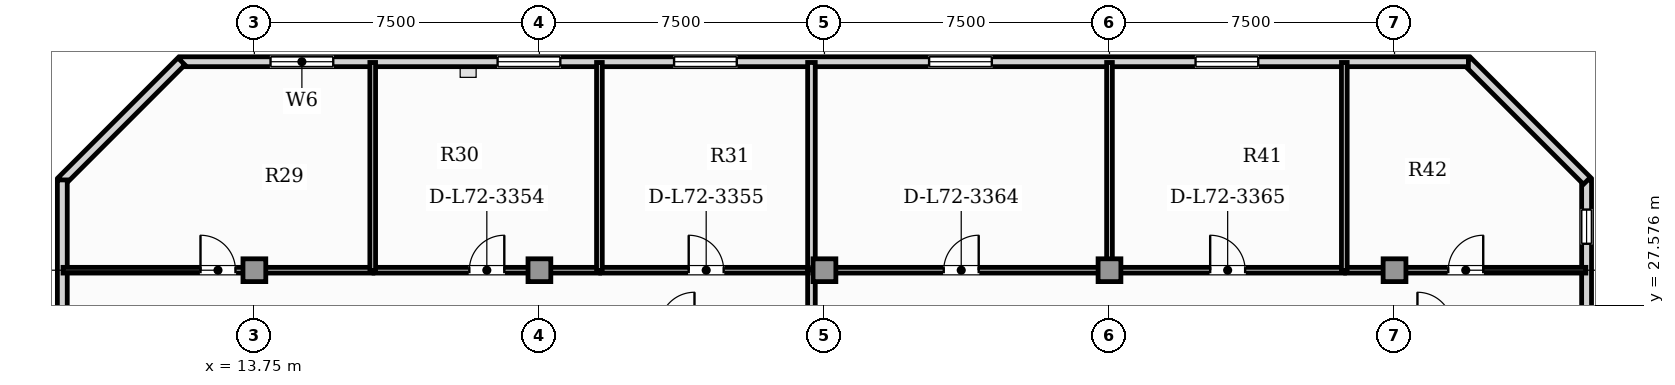
"""IFC4 building model, lengths in metres.
Left out: names, types, materials, properties, quantities, classifications, styles, units other than length and angle.
Written with IfcOpenShell. Run it as: python <this file> out.ifc"""

import sys

from ifc_helpers import new_model, si_unit, direction, frame, frame_2d, origin, origin_2d, place, context, subcontext, project, spatial, rectangle, extrude, element, fill, save


model = new_model("IFC4")
c1 = context("Model", 3, precision=1e-05, world=origin(), true_north=direction((0.0, 1.0)))
c2 = subcontext(c1, "Body", "Model", "MODEL_VIEW")
j1 = project(units=[si_unit("LENGTHUNIT", "METRE"), si_unit("PLANEANGLEUNIT", "RADIAN")], contexts=[c1])
p1 = place(None, origin())
s1 = spatial("IfcSite", under=j1, at=p1, CompositionType="ELEMENT")
p2 = place(p1, origin())
s2 = spatial("IfcBuilding", under=s1, at=p2, CompositionType="ELEMENT")
p3 = place(p2, frame((0.0, 0.0, 292.6)))
s3 = spatial("IfcBuildingStorey", under=s2, at=p3, CompositionType="ELEMENT", Elevation=292.6)
for number, where, z_axis, x_axis in (
    (1, (13.75, 28.5, 0.0), (0.0, 0.0, 1.0), (1.0, 0.0, 0.0)),
    (2, (21.25, 28.5, 0.0), (0.0, 0.0, 1.0), (1.0, 0.0, 0.0)),
    (3, (28.75, 28.5, 0.0), (0.0, 0.0, 1.0), (1.0, 0.0, 0.0)),
    (4, (36.25, 28.5, 0.0), (0.0, 0.0, 1.0), (1.0, 0.0, 0.0)),
    (5, (43.75, 28.5, 0.0), (0.0, 0.0, 1.0), (1.0, 0.0, 0.0)),
):
    element("IfcColumn", number, at=place(p3, frame(where, z_axis=z_axis, x_axis=x_axis)), inside=s3, PredefinedType="COLUMN", context=c2, shape_type="SweptSolid", body=[
        extrude(rectangle(XDim=0.6, YDim=0.6, at=origin_2d()), origin(), (0.0, 0.0, 1.0), 3.85),
    ])
p4 = place(p3, frame((48.804, 25.798, 0.0), z_axis=(0.0, 0.0, 1.0), x_axis=(0.0, 1.0, 0.0)))
e6 = element("IfcWall", 6, at=p4, inside=s3, PredefinedType="SOLIDWALL", context=c2, shape_type="SweptSolid", body=[
    extrude(rectangle(XDim=5.078, YDim=0.26, at=frame_2d((2.539, 0.0))), origin(), (0.0, 0.0, 1.0), 3.65),
])
p5 = place(p4, frame((3.398, 0.0, 0.95)))
e7 = element("IfcOpeningElement", 7, at=p5, cuts=e6, PredefinedType="OPENING", context=c2, shape_type="SweptSolid", body=[
    extrude(rectangle(XDim=0.9, YDim=1.5, at=frame_2d((0.45, 0.75))), frame((0.0, 0.14, 0.0), z_axis=(0.0, -1.0, 0.0), x_axis=(1.0, 0.0, 0.0)), (0.0, 0.0, 1.0), 0.28),
])
p6 = place(p3, frame((48.813, 30.852, 0.0), z_axis=(0.0, 0.0, 1.0), x_axis=(-0.707134240044, 0.707079321262, 0.0)))
e8 = element("IfcWall", 8, at=p6, inside=s3, PredefinedType="SOLIDWALL", context=c2, shape_type="SweptSolid", body=[
    extrude(rectangle(XDim=4.446, YDim=0.26, at=frame_2d((2.223, 0.0))), origin(), (0.0, 0.0, 1.0), 3.65),
])
p7 = place(p3, frame((45.694, 33.986, 0.0), z_axis=(0.0, 0.0, 1.0), x_axis=(-1.0, 0.0, 0.0)))
e9 = element("IfcWall", 9, at=p7, inside=s3, PredefinedType="SOLIDWALL", context=c2, shape_type="SweptSolid", body=[
    extrude(rectangle(XDim=33.887, YDim=0.26, at=frame_2d((16.944, 0.0))), origin(), (0.0, 0.0, 1.0), 3.65),
])
p8 = place(p7, frame((29.868, 0.0, 0.88)))
e10 = element("IfcOpeningElement", 10, at=p8, cuts=e9, PredefinedType="OPENING", context=c2, shape_type="SweptSolid", body=[
    extrude(rectangle(XDim=1.65, YDim=2.0, at=frame_2d((0.825, 1.0))), frame((0.0, 0.14, 0.0), z_axis=(0.0, -1.0, 0.0), x_axis=(1.0, 0.0, 0.0)), (0.0, 0.0, 1.0), 0.28),
])
p9 = place(p7, frame((23.894, 0.0, 0.88)))
e11 = element("IfcOpeningElement", 11, at=p9, cuts=e9, PredefinedType="OPENING", context=c2, shape_type="SweptSolid", body=[
    extrude(rectangle(XDim=1.65, YDim=2.0, at=frame_2d((0.825, 1.0))), frame((0.0, 0.14, 0.0), z_axis=(0.0, -1.0, 0.0), x_axis=(1.0, 0.0, 0.0)), (0.0, 0.0, 1.0), 0.28),
])
p10 = place(p7, frame((19.25, 0.0, 0.88)))
e12 = element("IfcOpeningElement", 12, at=p10, cuts=e9, PredefinedType="OPENING", context=c2, shape_type="SweptSolid", body=[
    extrude(rectangle(XDim=1.65, YDim=2.0, at=frame_2d((0.825, 1.0))), frame((0.0, 0.14, 0.0), z_axis=(0.0, -1.0, 0.0), x_axis=(1.0, 0.0, 0.0)), (0.0, 0.0, 1.0), 0.28),
])
p11 = place(p7, frame((12.54, 0.0, 0.88)))
e13 = element("IfcOpeningElement", 13, at=p11, cuts=e9, PredefinedType="OPENING", context=c2, shape_type="SweptSolid", body=[
    extrude(rectangle(XDim=1.65, YDim=2.0, at=frame_2d((0.825, 1.0))), frame((0.0, 0.14, 0.0), z_axis=(0.0, -1.0, 0.0), x_axis=(1.0, 0.0, 0.0)), (0.0, 0.0, 1.0), 0.28),
])
p12 = place(p7, frame((5.529, 0.0, 0.88)))
e14 = element("IfcOpeningElement", 14, at=p12, cuts=e9, PredefinedType="OPENING", context=c2, shape_type="SweptSolid", body=[
    extrude(rectangle(XDim=1.65, YDim=2.0, at=frame_2d((0.825, 1.0))), frame((0.0, 0.14, 0.0), z_axis=(0.0, -1.0, 0.0), x_axis=(1.0, 0.0, 0.0)), (0.0, 0.0, 1.0), 0.28),
])
p13 = place(p3, frame((11.83, 33.995, 0.0), z_axis=(0.0, 0.0, 1.0), x_axis=(-0.707134240044, -0.707079321262, 0.0)))
e15 = element("IfcWall", 15, at=p13, inside=s3, PredefinedType="SOLIDWALL", context=c2, shape_type="SweptSolid", body=[
    extrude(rectangle(XDim=4.446, YDim=0.26, at=frame_2d((2.223, 0.0))), origin(), (0.0, 0.0, 1.0), 3.65),
])
p14 = place(p3, frame((8.696, 30.875, 0.0), z_axis=(0.0, 0.0, 1.0), x_axis=(0.0, -1.0, 0.0)))
e16 = element("IfcWall", 16, at=p14, inside=s3, PredefinedType="SOLIDWALL", context=c2, shape_type="SweptSolid", body=[
    extrude(rectangle(XDim=5.078, YDim=0.26, at=frame_2d((2.539, 0.0))), origin(), (0.0, 0.0, 1.0), 3.65),
])
p15 = place(p3, frame((8.716, 28.5, 0.0), z_axis=(0.0, 0.0, 1.0), x_axis=(1.0, 0.0, 0.0)))
e17 = element("IfcWall", 17, at=p15, inside=s3, PredefinedType="PARTITIONING", context=c2, shape_type="SweptSolid", body=[
    extrude(rectangle(XDim=8.153, YDim=0.15, at=frame_2d((4.077, 0.0))), origin(), (0.0, 0.0, 1.0), 3.117),
])
p16 = place(p15, frame((3.616, 0.0, 0.0)))
e18 = element("IfcOpeningElement", 18, at=p16, cuts=e17, PredefinedType="OPENING", context=c2, shape_type="SweptSolid", body=[
    extrude(rectangle(XDim=0.92, YDim=2.1, at=frame_2d((0.46, 1.05))), frame((0.0, 0.085, 0.0), z_axis=(0.0, -1.0, 0.0), x_axis=(1.0, 0.0, 0.0)), (0.0, 0.0, 1.0), 0.17),
])
p17 = place(p3, frame((16.899, 28.5, 0.0), z_axis=(0.0, 0.0, 1.0), x_axis=(1.0, 0.0, 0.0)))
e19 = element("IfcWall", 19, at=p17, inside=s3, PredefinedType="PARTITIONING", context=c2, shape_type="SweptSolid", body=[
    extrude(rectangle(XDim=5.935, YDim=0.15, at=frame_2d((2.967, 0.0))), origin(), (0.0, 0.0, 1.0), 3.117),
])
p18 = place(p17, frame((2.507, 0.0, 0.0)))
e20 = element("IfcOpeningElement", 20, at=p18, cuts=e19, PredefinedType="OPENING", context=c2, shape_type="SweptSolid", body=[
    extrude(rectangle(XDim=0.92, YDim=2.1, at=frame_2d((0.46, 1.05))), frame((0.0, 0.085, 0.0), z_axis=(0.0, -1.0, 0.0), x_axis=(1.0, 0.0, 0.0)), (0.0, 0.0, 1.0), 0.17),
])
p19 = place(p3, frame((22.864, 28.5, 0.0), z_axis=(0.0, 0.0, 1.0), x_axis=(1.0, 0.0, 0.0)))
e21 = element("IfcWall", 21, at=p19, inside=s3, PredefinedType="PARTITIONING", context=c2, shape_type="SweptSolid", body=[
    extrude(rectangle(XDim=5.549, YDim=0.15, at=frame_2d((2.775, 0.0))), origin(), (0.0, 0.0, 1.0), 3.117),
])
p20 = place(p19, frame((2.315, 0.0, 0.0)))
e22 = element("IfcOpeningElement", 22, at=p20, cuts=e21, PredefinedType="OPENING", context=c2, shape_type="SweptSolid", body=[
    extrude(rectangle(XDim=0.92, YDim=2.1, at=frame_2d((0.46, 1.05))), frame((0.0, 0.085, 0.0), z_axis=(0.0, -1.0, 0.0), x_axis=(1.0, 0.0, 0.0)), (0.0, 0.0, 1.0), 0.17),
])
p21 = place(p3, frame((28.408, 26.995, 0.0), z_axis=(0.0, 0.0, 1.0), x_axis=(0.0, 1.0, 0.0)))
e23 = element("IfcWall", 23, at=p21, inside=s3, PredefinedType="PARTITIONING", context=c2, shape_type="SweptSolid", body=[
    extrude(rectangle(XDim=1.51, YDim=0.2, at=frame_2d((0.755, 0.0))), origin(), (0.0, 0.0, 1.0), 3.65),
])
for number, where, z_axis, x_axis in (
    (24, (16.864, 28.495, 0.0), (0.0, 0.0, 1.0), (0.0, 1.0, 0.0)),
    (25, (22.829, 28.495, 0.0), (0.0, 0.0, 1.0), (0.0, 1.0, 0.0)),
):
    element("IfcWall", number, at=place(p3, frame(where, z_axis=z_axis, x_axis=x_axis)), inside=s3, PredefinedType="PARTITIONING", context=c2, shape_type="SweptSolid", body=[
        extrude(rectangle(XDim=5.471, YDim=0.15, at=frame_2d((2.735, 0.0))), origin(), (0.0, 0.0, 1.0), 3.65),
    ])
p22 = place(p3, frame((28.408, 28.535, 0.0), z_axis=(0.0, 0.0, 1.0), x_axis=(0.0, 1.0, 0.0)))
e26 = element("IfcWall", 26, at=p22, inside=s3, PredefinedType="PARTITIONING", context=c2, shape_type="SweptSolid", body=[
    extrude(rectangle(XDim=5.431, YDim=0.2, at=frame_2d((2.716, 0.0))), origin(), (0.0, 0.0, 1.0), 3.65),
])
p23 = place(p3, frame((28.443, 28.5, 0.0), z_axis=(0.0, 0.0, 1.0), x_axis=(1.0, 0.0, 0.0)))
e27 = element("IfcWall", 27, at=p23, inside=s3, PredefinedType="PARTITIONING", context=c2, shape_type="SweptSolid", body=[
    extrude(rectangle(XDim=7.812, YDim=0.15, at=frame_2d((3.906, 0.0))), origin(), (0.0, 0.0, 1.0), 3.117),
])
p24 = place(p23, frame((3.446, 0.0, 0.0)))
e28 = element("IfcOpeningElement", 28, at=p24, cuts=e27, PredefinedType="OPENING", context=c2, shape_type="SweptSolid", body=[
    extrude(rectangle(XDim=0.92, YDim=2.1, at=frame_2d((0.46, 1.05))), frame((0.0, 0.085, 0.0), z_axis=(0.0, -1.0, 0.0), x_axis=(1.0, 0.0, 0.0)), (0.0, 0.0, 1.0), 0.17),
])
p25 = place(p3, frame((36.285, 28.5, 0.0), z_axis=(0.0, 0.0, 1.0), x_axis=(1.0, 0.0, 0.0)))
e29 = element("IfcWall", 29, at=p25, inside=s3, PredefinedType="PARTITIONING", context=c2, shape_type="SweptSolid", body=[
    extrude(rectangle(XDim=6.149, YDim=0.15, at=frame_2d((3.074, 0.0))), origin(), (0.0, 0.0, 1.0), 3.117),
])
p26 = place(p25, frame((2.614, 0.0, 0.0)))
e30 = element("IfcOpeningElement", 30, at=p26, cuts=e29, PredefinedType="OPENING", context=c2, shape_type="SweptSolid", body=[
    extrude(rectangle(XDim=0.92, YDim=2.1, at=frame_2d((0.46, 1.05))), frame((0.0, 0.085, 0.0), z_axis=(0.0, -1.0, 0.0), x_axis=(1.0, 0.0, 0.0)), (0.0, 0.0, 1.0), 0.17),
])
p27 = place(p3, frame((42.464, 28.5, 0.0), z_axis=(0.0, 0.0, 1.0), x_axis=(1.0, 0.0, 0.0)))
e31 = element("IfcWall", 31, at=p27, inside=s3, PredefinedType="PARTITIONING", context=c2, shape_type="SweptSolid", body=[
    extrude(rectangle(XDim=6.321, YDim=0.15, at=frame_2d((3.16, 0.0))), origin(), (0.0, 0.0, 1.0), 3.117),
])
p28 = place(p27, frame((2.7, 0.0, 0.0)))
e32 = element("IfcOpeningElement", 32, at=p28, cuts=e31, PredefinedType="OPENING", context=c2, shape_type="SweptSolid", body=[
    extrude(rectangle(XDim=0.92, YDim=2.1, at=frame_2d((0.46, 1.05))), frame((0.0, 0.085, 0.0), z_axis=(0.0, -1.0, 0.0), x_axis=(1.0, 0.0, 0.0)), (0.0, 0.0, 1.0), 0.17),
])
for number, where, z_axis, x_axis in (
    (33, (36.25, 28.495, 0.0), (0.0, 0.0, 1.0), (0.0, 1.0, 0.0)),
    (34, (42.429, 28.495, 0.0), (0.0, 0.0, 1.0), (0.0, 1.0, 0.0)),
):
    element("IfcWall", number, at=place(p3, frame(where, z_axis=z_axis, x_axis=x_axis)), inside=s3, PredefinedType="PARTITIONING", context=c2, shape_type="SweptSolid", body=[
        extrude(rectangle(XDim=5.471, YDim=0.15, at=frame_2d((2.735, 0.0))), origin(), (0.0, 0.0, 1.0), 3.65),
    ])
p29 = place(p8, origin())
e35 = element("IfcWindow", 35, at=p29, inside=s3, PartitioningType="SINGLE_PANEL", PredefinedType="WINDOW", context=c2, shape_type="SweptSolid", body=[
    extrude(rectangle(XDim=1.65, YDim=2.0, at=frame_2d((0.825, 1.0))), frame((0.0, 0.03, 0.0), z_axis=(0.0, -1.0, 0.0), x_axis=(1.0, 0.0, 0.0)), (0.0, 0.0, 1.0), 0.06),
])
fill(e10, e35)
p30 = place(p9, origin())
e36 = element("IfcWindow", 36, at=p30, inside=s3, PartitioningType="SINGLE_PANEL", PredefinedType="WINDOW", context=c2, shape_type="SweptSolid", body=[
    extrude(rectangle(XDim=1.65, YDim=2.0, at=frame_2d((0.825, 1.0))), frame((0.0, 0.03, 0.0), z_axis=(0.0, -1.0, 0.0), x_axis=(1.0, 0.0, 0.0)), (0.0, 0.0, 1.0), 0.06),
])
fill(e11, e36)
p31 = place(p10, origin())
e37 = element("IfcWindow", 37, at=p31, inside=s3, PartitioningType="SINGLE_PANEL", PredefinedType="WINDOW", context=c2, shape_type="SweptSolid", body=[
    extrude(rectangle(XDim=1.65, YDim=2.0, at=frame_2d((0.825, 1.0))), frame((0.0, 0.03, 0.0), z_axis=(0.0, -1.0, 0.0), x_axis=(1.0, 0.0, 0.0)), (0.0, 0.0, 1.0), 0.06),
])
fill(e12, e37)
p32 = place(p11, origin())
e38 = element("IfcWindow", 38, at=p32, inside=s3, PartitioningType="SINGLE_PANEL", PredefinedType="WINDOW", context=c2, shape_type="SweptSolid", body=[
    extrude(rectangle(XDim=1.65, YDim=2.0, at=frame_2d((0.825, 1.0))), frame((0.0, 0.03, 0.0), z_axis=(0.0, -1.0, 0.0), x_axis=(1.0, 0.0, 0.0)), (0.0, 0.0, 1.0), 0.06),
])
fill(e13, e38)
p33 = place(p12, origin())
e39 = element("IfcWindow", 39, at=p33, inside=s3, PartitioningType="SINGLE_PANEL", PredefinedType="WINDOW", context=c2, shape_type="SweptSolid", body=[
    extrude(rectangle(XDim=1.65, YDim=2.0, at=frame_2d((0.825, 1.0))), frame((0.0, 0.03, 0.0), z_axis=(0.0, -1.0, 0.0), x_axis=(1.0, 0.0, 0.0)), (0.0, 0.0, 1.0), 0.06),
])
fill(e14, e39)
p34 = place(p5, origin())
e40 = element("IfcWindow", 40, at=p34, inside=s3, PartitioningType="SINGLE_PANEL", PredefinedType="WINDOW", context=c2, shape_type="SweptSolid", body=[
    extrude(rectangle(XDim=0.9, YDim=1.5, at=frame_2d((0.45, 0.75))), frame((0.0, 0.03, 0.0), z_axis=(0.0, -1.0, 0.0), x_axis=(1.0, 0.0, 0.0)), (0.0, 0.0, 1.0), 0.06),
])
fill(e7, e40)
p35 = place(p16, origin())
e41 = element("IfcDoor", 41, at=p35, inside=s3, OperationType="SINGLE_SWING_LEFT", PredefinedType="DOOR", context=c2, shape_type="SweptSolid", body=[
    extrude(rectangle(XDim=0.92, YDim=2.1, at=frame_2d((0.46, 1.05))), frame((0.0, 0.025, 0.0), z_axis=(0.0, -1.0, 0.0), x_axis=(1.0, 0.0, 0.0)), (0.0, 0.0, 1.0), 0.05),
])
fill(e18, e41)
p36 = place(p18, origin())
e42 = element("IfcDoor", 42, at=p36, inside=s3, OperationType="SINGLE_SWING_RIGHT", PredefinedType="DOOR", context=c2, shape_type="SweptSolid", body=[
    extrude(rectangle(XDim=0.92, YDim=2.1, at=frame_2d((0.46, 1.05))), frame((0.0, 0.025, 0.0), z_axis=(0.0, -1.0, 0.0), x_axis=(1.0, 0.0, 0.0)), (0.0, 0.0, 1.0), 0.05),
])
fill(e20, e42)
p37 = place(p20, origin())
e43 = element("IfcDoor", 43, at=p37, inside=s3, OperationType="SINGLE_SWING_LEFT", PredefinedType="DOOR", context=c2, shape_type="SweptSolid", body=[
    extrude(rectangle(XDim=0.92, YDim=2.1, at=frame_2d((0.46, 1.05))), frame((0.0, 0.025, 0.0), z_axis=(0.0, -1.0, 0.0), x_axis=(1.0, 0.0, 0.0)), (0.0, 0.0, 1.0), 0.05),
])
fill(e22, e43)
p38 = place(p24, origin())
e44 = element("IfcDoor", 44, at=p38, inside=s3, OperationType="SINGLE_SWING_RIGHT", PredefinedType="DOOR", context=c2, shape_type="SweptSolid", body=[
    extrude(rectangle(XDim=0.92, YDim=2.1, at=frame_2d((0.46, 1.05))), frame((0.0, 0.025, 0.0), z_axis=(0.0, -1.0, 0.0), x_axis=(1.0, 0.0, 0.0)), (0.0, 0.0, 1.0), 0.05),
])
fill(e28, e44)
p39 = place(p26, origin())
e45 = element("IfcDoor", 45, at=p39, inside=s3, OperationType="SINGLE_SWING_LEFT", PredefinedType="DOOR", context=c2, shape_type="SweptSolid", body=[
    extrude(rectangle(XDim=0.92, YDim=2.1, at=frame_2d((0.46, 1.05))), frame((0.0, 0.025, 0.0), z_axis=(0.0, -1.0, 0.0), x_axis=(1.0, 0.0, 0.0)), (0.0, 0.0, 1.0), 0.05),
])
fill(e30, e45)
p40 = place(p28, origin())
e46 = element("IfcDoor", 46, at=p40, inside=s3, OperationType="SINGLE_SWING_RIGHT", PredefinedType="DOOR", context=c2, shape_type="SweptSolid", body=[
    extrude(rectangle(XDim=0.92, YDim=2.1, at=frame_2d((0.46, 1.05))), frame((0.0, 0.025, 0.0), z_axis=(0.0, -1.0, 0.0), x_axis=(1.0, 0.0, 0.0)), (0.0, 0.0, 1.0), 0.05),
])
fill(e32, e46)
save(model, sys.argv[1])
